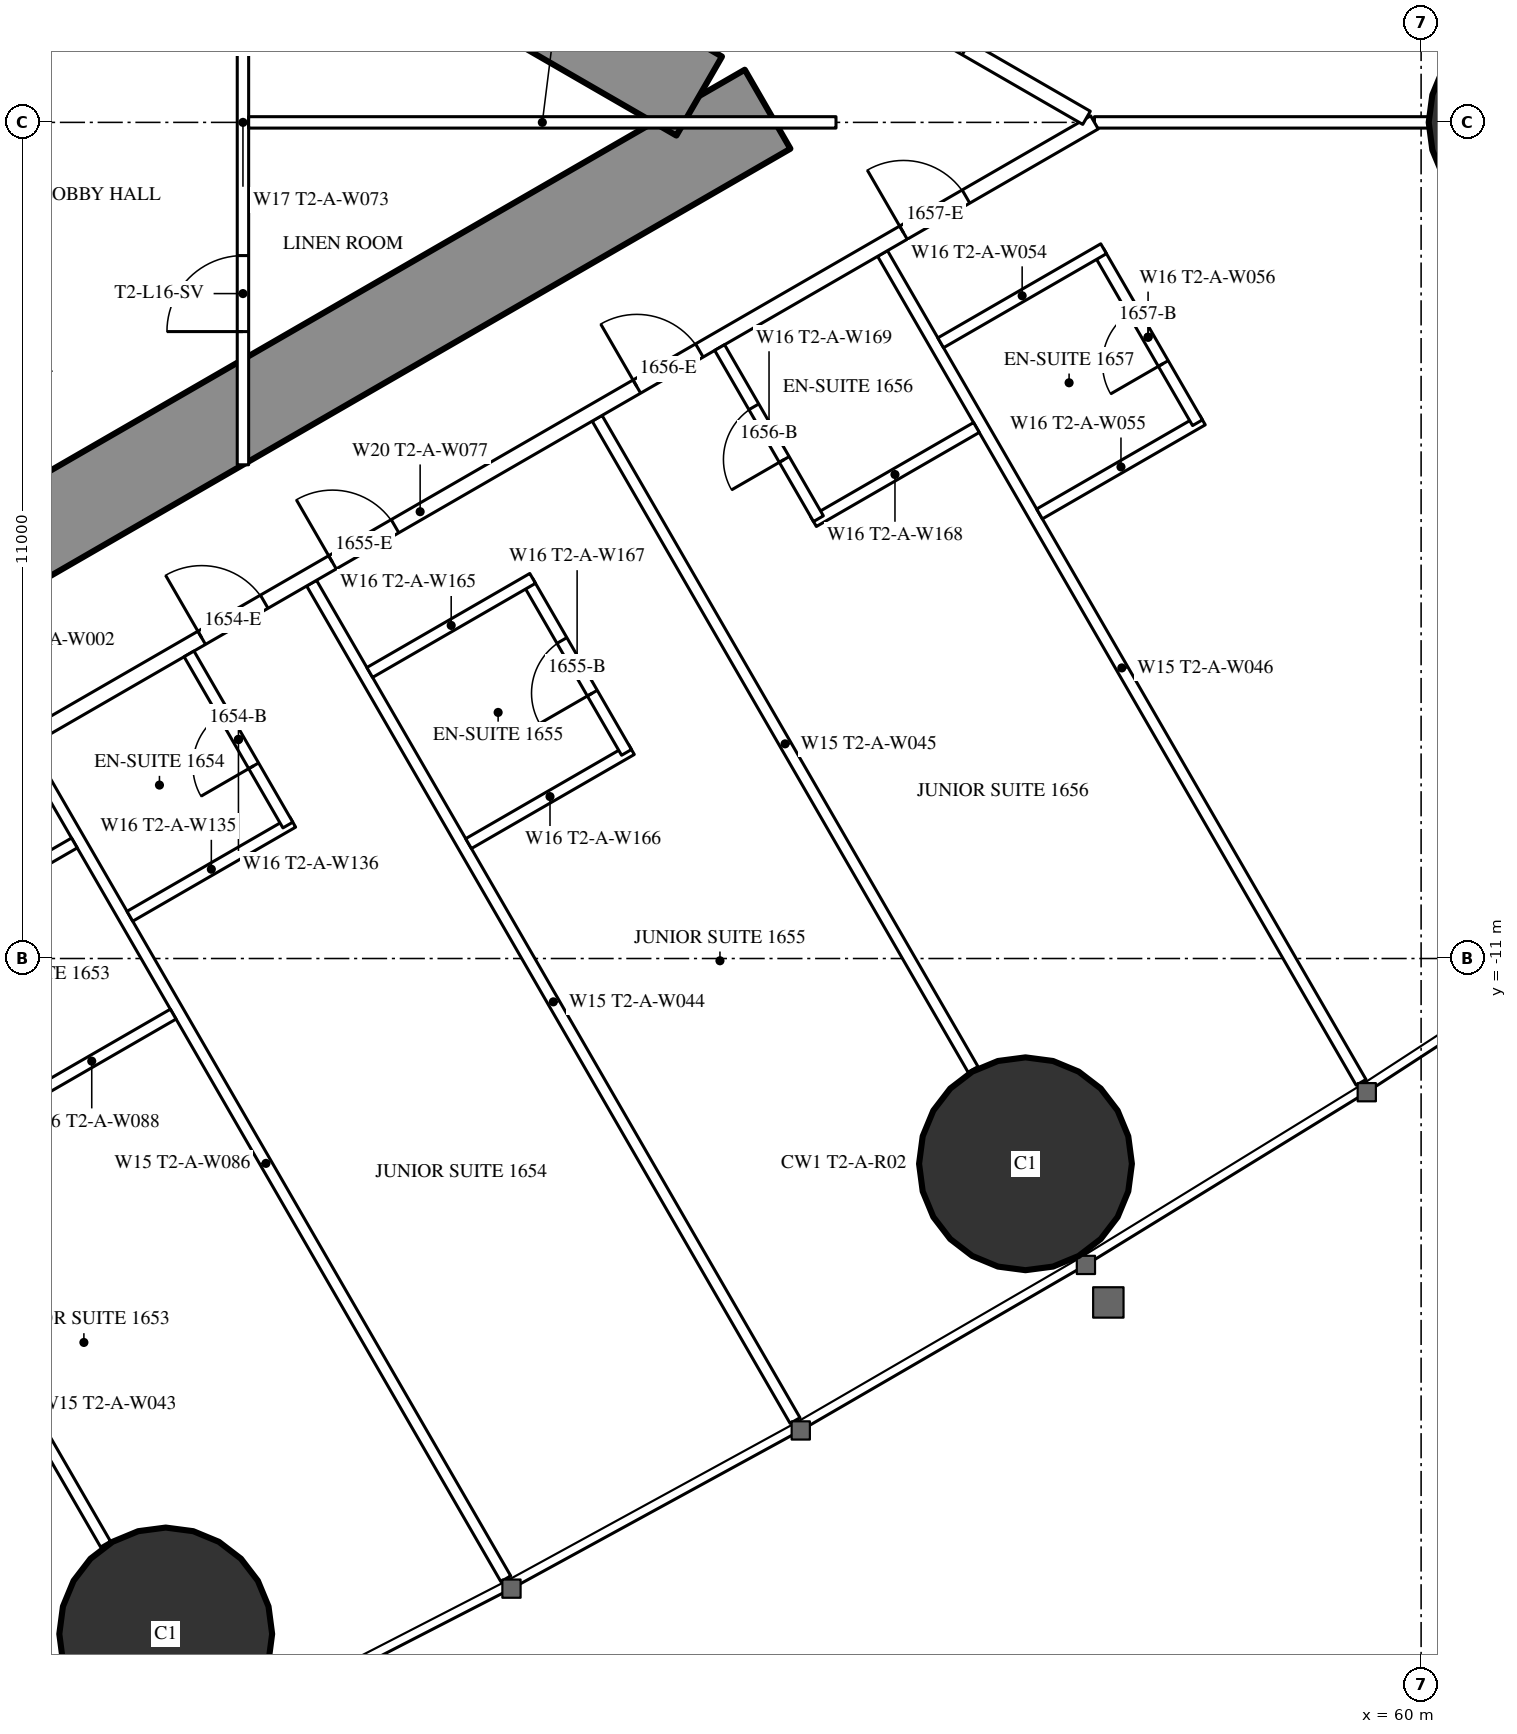
"""IFC4 building model, lengths in metres.
Left out: names, types, materials, properties, quantities, classifications, styles, units other than length and angle.
Written with IfcOpenShell. Run it as: python <this file> out.ifc"""

import sys

from ifc_helpers import new_model, si_unit, direction, frame, frame_2d, origin, origin_2d, place, context, subcontext, project, spatial, rectangle, hollow_circle, extrude, element, fill, save


model = new_model("IFC4")
c1 = context("Model", 3, precision=1e-05, world=origin(), true_north=direction((0.0, 1.0)))
c2 = subcontext(c1, "Body", "Model", "MODEL_VIEW")
j1 = project(units=[si_unit("LENGTHUNIT", "METRE"), si_unit("PLANEANGLEUNIT", "RADIAN")], contexts=[c1])
p1 = place(None, origin())
s1 = spatial("IfcSite", under=j1, at=p1, CompositionType="ELEMENT")
p2 = place(p1, origin())
s2 = spatial("IfcBuilding", under=s1, at=p2, CompositionType="ELEMENT")
p3 = place(p2, frame((0.0, 0.0, 63.5)))
s3 = spatial("IfcBuildingStorey", under=s2, at=p3, CompositionType="ELEMENT", Elevation=63.5)
for number, where, z_axis, x_axis in (
    (1, (43.484, -19.886, 0.0), (0.0, 0.0, 1.0), (1.0, 0.0, 0.0)),
    (2, (54.795, -13.701, 0.0), (0.0, 0.0, 1.0), (1.0, 0.0, 0.0)),
):
    element("IfcColumn", number, at=place(p3, frame(where, z_axis=z_axis, x_axis=x_axis)), inside=s3, PredefinedType="COLUMN", context=c2, shape_type="SweptSolid", body=[
        extrude(hollow_circle(Radius=1.4, WallThickness=0.12, at=origin_2d()), origin(), (0.0, 0.0, 1.0), 3.5),
    ])
p4 = place(p3, frame((61.5, 0.0, 0.0), z_axis=(0.0, 0.0, 1.0), x_axis=(1.0, 0.0, 0.0)))
e3 = element("IfcColumn", 3, at=p4, inside=s3, PredefinedType="COLUMN", context=c2, shape_type="SweptSolid", body=[
    extrude(hollow_circle(Radius=1.4, WallThickness=0.1, at=origin_2d()), origin(), (0.0, 0.0, 1.0), 3.5),
])
p5 = place(p3, frame((27.2, -13.8, 0.0), z_axis=(0.0, 0.0, 1.0), x_axis=(0.866027159892, 0.499996958321, 0.0)))
e4 = element("IfcWall", 4, at=p5, inside=s3, PredefinedType="SHEAR", context=c2, shape_type="SweptSolid", body=[
    extrude(rectangle(XDim=27.947, YDim=1.2, at=frame_2d((13.973, 0.0))), origin(), (0.0, 0.0, 1.0), 3.5),
])
p6 = place(p5, frame((4.6, 0.0, 0.0)))
e5 = element("IfcOpeningElement", 5, at=p6, cuts=e4, PredefinedType="OPENING", context=c2, shape_type="SweptSolid", body=[
    extrude(rectangle(XDim=1.0, YDim=2.2, at=frame_2d((0.5, 1.1))), frame((0.0, 0.61, 0.0), z_axis=(0.0, -1.0, 0.0), x_axis=(1.0, 0.0, 0.0)), (0.0, 0.0, 1.0), 1.22),
])
p7 = place(p5, frame((13.395, 0.0, 0.0)))
e6 = element("IfcOpeningElement", 6, at=p7, cuts=e4, PredefinedType="OPENING", context=c2, shape_type="SweptSolid", body=[
    extrude(rectangle(XDim=1.8, YDim=2.2, at=frame_2d((0.9, 1.1))), frame((0.0, 0.61, 0.0), z_axis=(0.0, -1.0, 0.0), x_axis=(1.0, 0.0, 0.0)), (0.0, 0.0, 1.0), 1.22),
])
p8 = place(p3, frame((27.2, 13.8, 0.0), z_axis=(0.0, 0.0, 1.0), x_axis=(0.866024515034, -0.500001539357, 0.0)))
e7 = element("IfcWall", 7, at=p8, inside=s3, PredefinedType="SHEAR", context=c2, shape_type="SweptSolid", body=[
    extrude(rectangle(XDim=26.907, YDim=1.2, at=frame_2d((13.454, 0.0))), origin(), (0.0, 0.0, 1.0), 3.5),
])
p9 = place(p8, frame((4.6, 0.0, 0.0)))
e8 = element("IfcOpeningElement", 8, at=p9, cuts=e7, PredefinedType="OPENING", context=c2, shape_type="SweptSolid", body=[
    extrude(rectangle(XDim=1.0, YDim=2.2, at=frame_2d((0.5, 1.1))), frame((0.0, 0.61, 0.0), z_axis=(0.0, -1.0, 0.0), x_axis=(1.0, 0.0, 0.0)), (0.0, 0.0, 1.0), 1.22),
])
p10 = place(p8, frame((13.395, 0.0, 0.0)))
e9 = element("IfcOpeningElement", 9, at=p10, cuts=e7, PredefinedType="OPENING", context=c2, shape_type="SweptSolid", body=[
    extrude(rectangle(XDim=1.8, YDim=2.2, at=frame_2d((0.9, 1.1))), frame((0.0, 0.61, 0.0), z_axis=(0.0, -1.0, 0.0), x_axis=(1.0, 0.0, 0.0)), (0.0, 0.0, 1.0), 1.22),
])
p11 = place(p3, frame((41.647, -8.23, 0.0), z_axis=(0.0, 0.0, 1.0), x_axis=(0.49998590462, -0.866033541603, 0.0)))
e10 = element("IfcWall", 10, at=p11, inside=s3, PredefinedType="PARTITIONING", context=c2, shape_type="SweptSolid", body=[
    extrude(rectangle(XDim=12.621, YDim=0.15, at=frame_2d((6.311, 0.0))), origin(), (0.0, 0.0, 1.0), 3.25),
])
p12 = place(p3, frame((45.403, -6.062, 0.0), z_axis=(0.0, 0.0, 1.0), x_axis=(0.500007077968, -0.866021317279, 0.0)))
e11 = element("IfcWall", 11, at=p12, inside=s3, PredefinedType="PARTITIONING", context=c2, shape_type="SweptSolid", body=[
    extrude(rectangle(XDim=12.721, YDim=0.15, at=frame_2d((6.361, 0.0))), origin(), (0.0, 0.0, 1.0), 3.25),
])
p13 = place(p3, frame((49.159, -3.893, 0.0), z_axis=(0.0, 0.0, 1.0), x_axis=(0.499998773722, -0.866026111775, 0.0)))
e12 = element("IfcWall", 12, at=p13, inside=s3, PredefinedType="PARTITIONING", context=c2, shape_type="SweptSolid", body=[
    extrude(rectangle(XDim=9.892, YDim=0.15, at=frame_2d((4.946, 0.0))), origin(), (0.0, 0.0, 1.0), 2.25),
])
p14 = place(p3, frame((52.915, -1.725, 0.0), z_axis=(0.0, 0.0, 1.0), x_axis=(0.499997163113, -0.866027041656, 0.0)))
e13 = element("IfcWall", 13, at=p14, inside=s3, PredefinedType="PARTITIONING", context=c2, shape_type="SweptSolid", body=[
    extrude(rectangle(XDim=12.591, YDim=0.15, at=frame_2d((6.295, 0.0))), origin(), (0.0, 0.0, 1.0), 3.25),
])
p15 = place(p3, frame((55.702, 0.0, 0.0), z_axis=(0.0, 0.0, 1.0), x_axis=(1.0, 0.0, 0.0)))
e14 = element("IfcWall", 14, at=p15, inside=s3, PredefinedType="PARTITIONING", context=c2, shape_type="SweptSolid", body=[
    extrude(rectangle(XDim=16.117, YDim=0.15, at=frame_2d((8.059, 0.0))), origin(), (0.0, 0.0, 1.0), 2.25),
])
p16 = place(p3, frame((40.57, -15.03, 0.0), z_axis=(0.0, 0.0, 1.0), x_axis=(0.500012993597, -0.866017901798, 0.0)))
e15 = element("IfcWall", 15, at=p16, inside=s3, PredefinedType="PARTITIONING", context=c2, shape_type="SweptSolid", body=[
    extrude(rectangle(XDim=4.243, YDim=0.15, at=frame_2d((2.122, 0.0))), origin(), (0.0, 0.0, 1.0), 3.25),
])
p17 = place(p3, frame((37.96, -10.243, 0.0), z_axis=(0.0, 0.0, 1.0), x_axis=(0.866026429433, 0.499998223521, 0.0)))
e16 = element("IfcWall", 16, at=p17, inside=s3, PredefinedType="PARTITIONING", context=c2, shape_type="SweptSolid", body=[
    extrude(rectangle(XDim=20.487, YDim=0.2, at=frame_2d((10.243, 0.0))), origin(), (0.0, 0.0, 1.0), 3.25),
])
p18 = place(p17, frame((6.925, 0.0, 0.0)))
e17 = element("IfcOpeningElement", 17, at=p18, cuts=e16, PredefinedType="OPENING", context=c2, shape_type="SweptSolid", body=[
    extrude(rectangle(XDim=0.95, YDim=2.2, at=frame_2d((0.475, 1.1))), frame((0.0, 0.11, 0.0), z_axis=(0.0, -1.0, 0.0), x_axis=(1.0, 0.0, 0.0)), (0.0, 0.0, 1.0), 0.22),
])
p19 = place(p17, frame((8.912, 0.0, 0.0)))
e18 = element("IfcOpeningElement", 18, at=p19, cuts=e16, PredefinedType="OPENING", context=c2, shape_type="SweptSolid", body=[
    extrude(rectangle(XDim=0.95, YDim=2.2, at=frame_2d((0.475, 1.1))), frame((0.0, 0.11, 0.0), z_axis=(0.0, -1.0, 0.0), x_axis=(1.0, 0.0, 0.0)), (0.0, 0.0, 1.0), 0.22),
])
p20 = place(p17, frame((13.535, 0.0, 0.0)))
e19 = element("IfcOpeningElement", 19, at=p20, cuts=e16, PredefinedType="OPENING", context=c2, shape_type="SweptSolid", body=[
    extrude(rectangle(XDim=0.95, YDim=2.2, at=frame_2d((0.475, 1.1))), frame((0.0, 0.11, 0.0), z_axis=(0.0, -1.0, 0.0), x_axis=(1.0, 0.0, 0.0)), (0.0, 0.0, 1.0), 0.22),
])
p21 = place(p17, frame((17.585, 0.0, 0.0)))
e20 = element("IfcOpeningElement", 20, at=p21, cuts=e16, PredefinedType="OPENING", context=c2, shape_type="SweptSolid", body=[
    extrude(rectangle(XDim=0.95, YDim=2.2, at=frame_2d((0.475, 1.1))), frame((0.0, 0.11, 0.0), z_axis=(0.0, -1.0, 0.0), x_axis=(1.0, 0.0, 0.0)), (0.0, 0.0, 1.0), 0.22),
])
p22 = place(p17, frame((2.875, 0.0, 0.0)))
e21 = element("IfcOpeningElement", 21, at=p22, cuts=e16, PredefinedType="OPENING", context=c2, shape_type="SweptSolid", body=[
    extrude(rectangle(XDim=0.95, YDim=2.2, at=frame_2d((0.475, 1.1))), frame((0.0, 0.11, 0.0), z_axis=(0.0, -1.0, 0.0), x_axis=(1.0, 0.0, 0.0)), (0.0, 0.0, 1.0), 0.22),
])
p23 = place(p3, frame((41.619, 8.131, 0.0), z_axis=(0.0, 0.0, 1.0), x_axis=(0.86603245327, -0.499987789734, 0.0)))
e22 = element("IfcWall", 22, at=p23, inside=s3, PredefinedType="PARTITIONING", context=c2, shape_type="SweptSolid", body=[
    extrude(rectangle(XDim=16.142, YDim=0.2, at=frame_2d((8.071, 0.0))), origin(), (0.0, 0.0, 1.0), 3.25),
])
p24 = place(p23, frame((13.36, 0.0, 0.0)))
e23 = element("IfcOpeningElement", 23, at=p24, cuts=e22, PredefinedType="OPENING", context=c2, shape_type="SweptSolid", body=[
    extrude(rectangle(XDim=0.95, YDim=2.2, at=frame_2d((0.475, 1.1))), frame((0.0, 0.11, 0.0), z_axis=(0.0, -1.0, 0.0), x_axis=(1.0, 0.0, 0.0)), (0.0, 0.0, 1.0), 0.22),
])
p25 = place(p23, frame((4.687, 0.0, 0.0)))
e24 = element("IfcOpeningElement", 24, at=p25, cuts=e22, PredefinedType="OPENING", context=c2, shape_type="SweptSolid", body=[
    extrude(rectangle(XDim=0.95, YDim=2.2, at=frame_2d((0.475, 1.1))), frame((0.0, 0.11, 0.0), z_axis=(0.0, -1.0, 0.0), x_axis=(1.0, 0.0, 0.0)), (0.0, 0.0, 1.0), 0.22),
])
p26 = place(p23, frame((2.987, 0.0, 0.0)))
e25 = element("IfcOpeningElement", 25, at=p26, cuts=e22, PredefinedType="OPENING", context=c2, shape_type="SweptSolid", body=[
    extrude(rectangle(XDim=0.95, YDim=2.2, at=frame_2d((0.475, 1.1))), frame((0.0, 0.11, 0.0), z_axis=(0.0, -1.0, 0.0), x_axis=(1.0, 0.0, 0.0)), (0.0, 0.0, 1.0), 0.22),
])
p27 = place(p3, frame((43.012, -10.444, 0.0), z_axis=(0.0, 0.0, 1.0), x_axis=(0.866031185235, 0.4999899861, 0.0)))
e26 = element("IfcWall", 26, at=p27, inside=s3, PredefinedType="PARTITIONING", context=c2, shape_type="SweptSolid", body=[
    extrude(rectangle(XDim=2.475, YDim=0.15, at=frame_2d((1.238, 0.0))), origin(), (0.0, 0.0, 1.0), 3.25),
])
p28 = place(p3, frame((43.791, -6.993, 0.0), z_axis=(0.0, 0.0, 1.0), x_axis=(0.500047596559, -0.865997922154, 0.0)))
e27 = element("IfcWall", 27, at=p28, inside=s3, PredefinedType="PARTITIONING", context=c2, shape_type="SweptSolid", body=[
    extrude(rectangle(XDim=2.6, YDim=0.15, at=frame_2d((1.3, 0.0))), origin(), (0.0, 0.0, 1.0), 3.25),
])
p29 = place(p28, frame((0.9, 0.0, 0.0)))
e28 = element("IfcOpeningElement", 28, at=p29, cuts=e27, PredefinedType="OPENING", context=c2, shape_type="SweptSolid", body=[
    extrude(rectangle(XDim=0.8, YDim=2.2, at=frame_2d((0.4, 1.1))), frame((0.0, 0.085, 0.0), z_axis=(0.0, -1.0, 0.0), x_axis=(1.0, 0.0, 0.0)), (0.0, 0.0, 1.0), 0.17),
])
p30 = place(p3, frame((47.468, -9.488, 0.0), z_axis=(0.0, 0.0, 1.0), x_axis=(0.86604923931, 0.499958713387, 0.0)))
e29 = element("IfcWall", 29, at=p30, inside=s3, PredefinedType="PARTITIONING", context=c2, shape_type="SweptSolid", body=[
    extrude(rectangle(XDim=2.475, YDim=0.15, at=frame_2d((1.237, 0.0))), origin(), (0.0, 0.0, 1.0), 3.25),
])
p31 = place(p3, frame((48.246, -6.037, 0.0), z_axis=(0.0, 0.0, 1.0), x_axis=(0.500006934395, -0.866021400173, 0.0)))
e30 = element("IfcWall", 30, at=p31, inside=s3, PredefinedType="PARTITIONING", context=c2, shape_type="SweptSolid", body=[
    extrude(rectangle(XDim=2.6, YDim=0.15, at=frame_2d((1.3, 0.0))), origin(), (0.0, 0.0, 1.0), 3.25),
])
p32 = place(p31, frame((0.9, 0.0, 0.0)))
e31 = element("IfcOpeningElement", 31, at=p32, cuts=e30, PredefinedType="OPENING", context=c2, shape_type="SweptSolid", body=[
    extrude(rectangle(XDim=0.8, YDim=2.2, at=frame_2d((0.4, 1.1))), frame((0.0, 0.085, 0.0), z_axis=(0.0, -1.0, 0.0), x_axis=(1.0, 0.0, 0.0)), (0.0, 0.0, 1.0), 0.17),
])
for number, where, z_axis, x_axis in (
    (32, (46.168, -7.237, 0.0), (0.0, 0.0, 1.0), (0.866, 0.5, 0.0)),
    (33, (52.006, -5.251, 0.0), (0.0, 0.0, 1.0), (0.866, 0.5, 0.0)),
):
    element("IfcWall", number, at=place(p3, frame(where, z_axis=z_axis, x_axis=x_axis)), inside=s3, PredefinedType="PARTITIONING", context=c2, shape_type="SweptSolid", body=[
        extrude(rectangle(XDim=2.475, YDim=0.15, at=frame_2d((1.237, 0.0))), origin(), (0.0, 0.0, 1.0), 3.25),
    ])
p33 = place(p3, frame((50.771, -2.962, 0.0), z_axis=(0.0, 0.0, 1.0), x_axis=(0.500006934395, -0.866021400173, 0.0)))
e34 = element("IfcWall", 34, at=p33, inside=s3, PredefinedType="PARTITIONING", context=c2, shape_type="SweptSolid", body=[
    extrude(rectangle(XDim=2.6, YDim=0.15, at=frame_2d((1.3, 0.0))), origin(), (0.0, 0.0, 1.0), 3.25),
])
p34 = place(p33, frame((0.9, 0.0, 0.0)))
e35 = element("IfcOpeningElement", 35, at=p34, cuts=e34, PredefinedType="OPENING", context=c2, shape_type="SweptSolid", body=[
    extrude(rectangle(XDim=0.8, YDim=2.2, at=frame_2d((0.4, 1.1))), frame((0.0, 0.085, 0.0), z_axis=(0.0, -1.0, 0.0), x_axis=(1.0, 0.0, 0.0)), (0.0, 0.0, 1.0), 0.17),
])
p35 = place(p3, frame((54.98, -5.151, 0.0), z_axis=(0.0, 0.0, 1.0), x_axis=(0.86604923931, 0.499958713387, 0.0)))
e36 = element("IfcWall", 36, at=p35, inside=s3, PredefinedType="PARTITIONING", context=c2, shape_type="SweptSolid", body=[
    extrude(rectangle(XDim=2.475, YDim=0.15, at=frame_2d((1.237, 0.0))), origin(), (0.0, 0.0, 1.0), 3.25),
])
p36 = place(p3, frame((55.758, -1.7, 0.0), z_axis=(0.0, 0.0, 1.0), x_axis=(0.500006934395, -0.866021400173, 0.0)))
e37 = element("IfcWall", 37, at=p36, inside=s3, PredefinedType="PARTITIONING", context=c2, shape_type="SweptSolid", body=[
    extrude(rectangle(XDim=2.6, YDim=0.15, at=frame_2d((1.3, 0.0))), origin(), (0.0, 0.0, 1.0), 3.25),
])
p37 = place(p36, frame((0.9, 0.0, 0.0)))
e38 = element("IfcOpeningElement", 38, at=p37, cuts=e37, PredefinedType="OPENING", context=c2, shape_type="SweptSolid", body=[
    extrude(rectangle(XDim=0.8, YDim=2.2, at=frame_2d((0.4, 1.1))), frame((0.0, 0.085, 0.0), z_axis=(0.0, -1.0, 0.0), x_axis=(1.0, 0.0, 0.0)), (0.0, 0.0, 1.0), 0.17),
])
p38 = place(p3, frame((53.68, -2.9, 0.0), z_axis=(0.0, 0.0, 1.0), x_axis=(0.866006523861, 0.500032699561, 0.0)))
e39 = element("IfcWall", 39, at=p38, inside=s3, PredefinedType="PARTITIONING", context=c2, shape_type="SweptSolid", body=[
    extrude(rectangle(XDim=2.475, YDim=0.15, at=frame_2d((1.237, 0.0))), origin(), (0.0, 0.0, 1.0), 3.25),
])
for number, where, z_axis, x_axis in (
    (40, (41.439, -12.969, 0.0), (0.0, 0.0, 1.0), (0.866, 0.5, 0.0)),
    (41, (40.139, -10.718, 0.0), (0.0, 0.0, 1.0), (0.866, 0.5, 0.0)),
):
    element("IfcWall", number, at=place(p3, frame(where, z_axis=z_axis, x_axis=x_axis)), inside=s3, PredefinedType="PARTITIONING", context=c2, shape_type="SweptSolid", body=[
        extrude(rectangle(XDim=2.475, YDim=0.15, at=frame_2d((1.238, 0.0))), origin(), (0.0, 0.0, 1.0), 3.25),
    ])
p39 = place(p3, frame((44.5, -4.505, 0.0), z_axis=(0.0, 0.0, 1.0), x_axis=(0.0, 1.0, 0.0)))
e42 = element("IfcWall", 42, at=p39, inside=s3, PredefinedType="PARTITIONING", context=c2, shape_type="SweptSolid", body=[
    extrude(rectangle(XDim=9.009, YDim=0.15, at=frame_2d((4.505, 0.0))), origin(), (0.0, 0.0, 1.0), 2.45),
])
p40 = place(p39, frame((1.752, 0.0, 0.0)))
e43 = element("IfcOpeningElement", 43, at=p40, cuts=e42, PredefinedType="OPENING", context=c2, shape_type="SweptSolid", body=[
    extrude(rectangle(XDim=1.0, YDim=2.2, at=frame_2d((0.5, 1.1))), frame((0.0, 0.085, 0.0), z_axis=(0.0, -1.0, 0.0), x_axis=(1.0, 0.0, 0.0)), (0.0, 0.0, 1.0), 0.17),
])
p41 = place(p39, frame((6.257, 0.0, 0.0)))
e44 = element("IfcOpeningElement", 44, at=p41, cuts=e42, PredefinedType="OPENING", context=c2, shape_type="SweptSolid", body=[
    extrude(rectangle(XDim=1.0, YDim=2.2, at=frame_2d((0.5, 1.1))), frame((0.0, 0.085, 0.0), z_axis=(0.0, -1.0, 0.0), x_axis=(1.0, 0.0, 0.0)), (0.0, 0.0, 1.0), 0.17),
])
p42 = place(p3, frame((44.575, 0.0, 0.0), z_axis=(0.0, 0.0, 1.0), x_axis=(1.0, 0.0, 0.0)))
e45 = element("IfcWall", 45, at=p42, inside=s3, PredefinedType="PARTITIONING", context=c2, shape_type="SweptSolid", body=[
    extrude(rectangle(XDim=7.727, YDim=0.15, at=frame_2d((3.864, 0.0))), origin(), (0.0, 0.0, 1.0), 2.25),
])
p43 = place(p29, origin())
e46 = element("IfcDoor", 46, at=p43, inside=s3, OperationType="SINGLE_SWING_RIGHT", PredefinedType="DOOR", context=c2, shape_type="SweptSolid", body=[
    extrude(rectangle(XDim=0.8, YDim=2.2, at=frame_2d((0.4, 1.1))), frame((0.0, 0.025, 0.0), z_axis=(0.0, -1.0, 0.0), x_axis=(1.0, 0.0, 0.0)), (0.0, 0.0, 1.0), 0.05),
])
fill(e28, e46)
p44 = place(p18, origin())
e47 = element("IfcDoor", 47, at=p44, inside=s3, OperationType="SINGLE_SWING_LEFT", PredefinedType="DOOR", context=c2, shape_type="SweptSolid", body=[
    extrude(rectangle(XDim=0.95, YDim=2.2, at=frame_2d((0.475, 1.1))), frame((0.0, 0.025, 0.0), z_axis=(0.0, -1.0, 0.0), x_axis=(1.0, 0.0, 0.0)), (0.0, 0.0, 1.0), 0.05),
])
fill(e17, e47)
p45 = place(p32, origin())
e48 = element("IfcDoor", 48, at=p45, inside=s3, OperationType="SINGLE_SWING_RIGHT", PredefinedType="DOOR", context=c2, shape_type="SweptSolid", body=[
    extrude(rectangle(XDim=0.8, YDim=2.2, at=frame_2d((0.4, 1.1))), frame((0.0, 0.025, 0.0), z_axis=(0.0, -1.0, 0.0), x_axis=(1.0, 0.0, 0.0)), (0.0, 0.0, 1.0), 0.05),
])
fill(e31, e48)
p46 = place(p19, origin())
e49 = element("IfcDoor", 49, at=p46, inside=s3, OperationType="SINGLE_SWING_LEFT", PredefinedType="DOOR", context=c2, shape_type="SweptSolid", body=[
    extrude(rectangle(XDim=0.95, YDim=2.2, at=frame_2d((0.475, 1.1))), frame((0.0, 0.025, 0.0), z_axis=(0.0, -1.0, 0.0), x_axis=(1.0, 0.0, 0.0)), (0.0, 0.0, 1.0), 0.05),
])
fill(e18, e49)
p47 = place(p34, origin())
e50 = element("IfcDoor", 50, at=p47, inside=s3, OperationType="SINGLE_SWING_RIGHT", PredefinedType="DOOR", context=c2, shape_type="SweptSolid", body=[
    extrude(rectangle(XDim=0.8, YDim=2.2, at=frame_2d((0.4, 1.1))), frame((0.0, 0.025, 0.0), z_axis=(0.0, -1.0, 0.0), x_axis=(1.0, 0.0, 0.0)), (0.0, 0.0, 1.0), 0.05),
])
fill(e35, e50)
p48 = place(p20, origin())
e51 = element("IfcDoor", 51, at=p48, inside=s3, OperationType="SINGLE_SWING_LEFT", PredefinedType="DOOR", context=c2, shape_type="SweptSolid", body=[
    extrude(rectangle(XDim=0.95, YDim=2.2, at=frame_2d((0.475, 1.1))), frame((0.0, 0.025, 0.0), z_axis=(0.0, -1.0, 0.0), x_axis=(1.0, 0.0, 0.0)), (0.0, 0.0, 1.0), 0.05),
])
fill(e19, e51)
p49 = place(p37, origin())
e52 = element("IfcDoor", 52, at=p49, inside=s3, OperationType="SINGLE_SWING_RIGHT", PredefinedType="DOOR", context=c2, shape_type="SweptSolid", body=[
    extrude(rectangle(XDim=0.8, YDim=2.2, at=frame_2d((0.4, 1.1))), frame((0.0, 0.025, 0.0), z_axis=(0.0, -1.0, 0.0), x_axis=(1.0, 0.0, 0.0)), (0.0, 0.0, 1.0), 0.05),
])
fill(e38, e52)
p50 = place(p21, origin())
e53 = element("IfcDoor", 53, at=p50, inside=s3, OperationType="SINGLE_SWING_LEFT", PredefinedType="DOOR", context=c2, shape_type="SweptSolid", body=[
    extrude(rectangle(XDim=0.95, YDim=2.2, at=frame_2d((0.475, 1.1))), frame((0.0, 0.025, 0.0), z_axis=(0.0, -1.0, 0.0), x_axis=(1.0, 0.0, 0.0)), (0.0, 0.0, 1.0), 0.05),
])
fill(e20, e53)
p51 = place(p40, origin())
e54 = element("IfcDoor", 54, at=p51, inside=s3, OperationType="SINGLE_SWING_LEFT", PredefinedType="DOOR", context=c2, shape_type="SweptSolid", body=[
    extrude(rectangle(XDim=1.0, YDim=2.2, at=frame_2d((0.5, 1.1))), frame((0.0, 0.025, 0.0), z_axis=(0.0, -1.0, 0.0), x_axis=(1.0, 0.0, 0.0)), (0.0, 0.0, 1.0), 0.05),
])
fill(e43, e54)
save(model, sys.argv[1])
